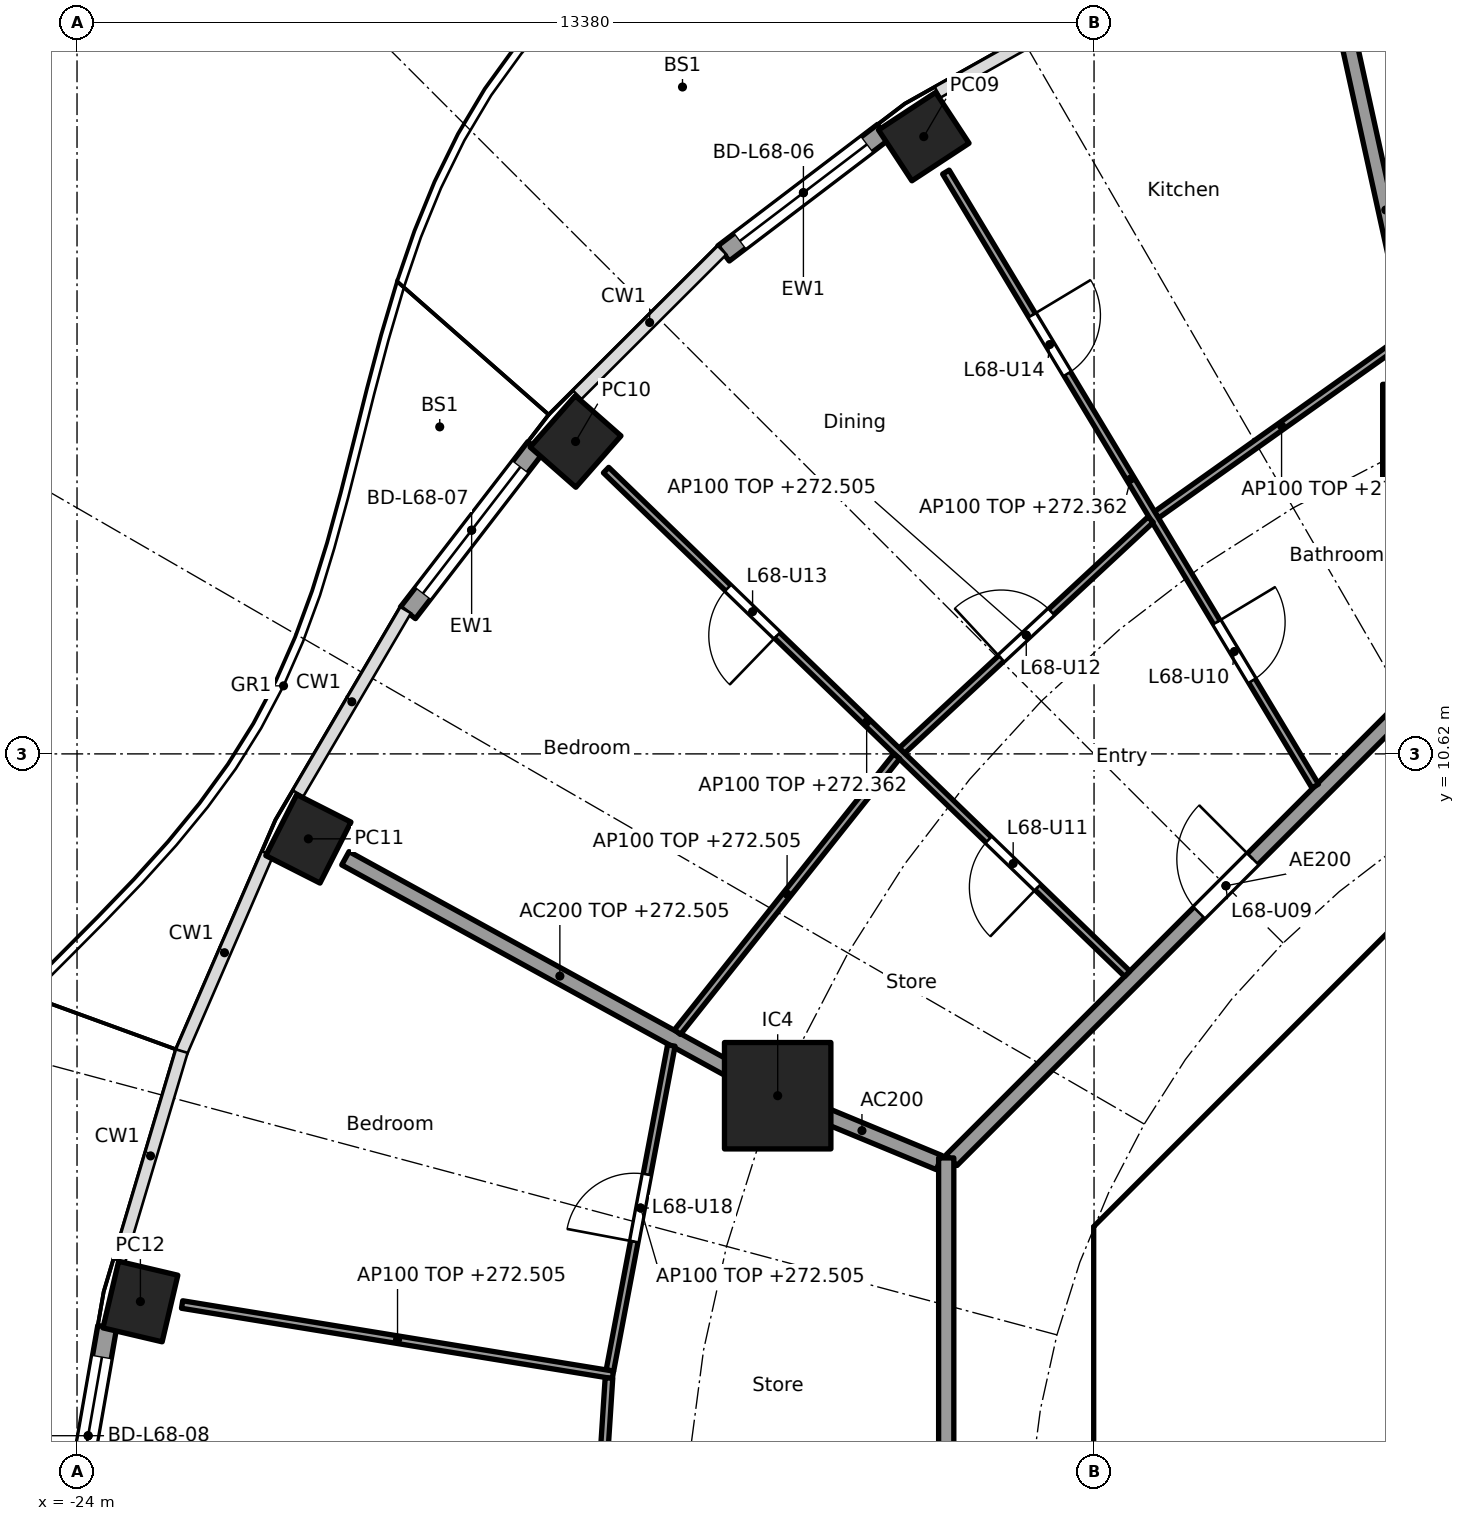
"""IFC4 building model, lengths in metres.
Left out: names, types, materials, properties, quantities, classifications, styles, units other than length and angle.
Written with IfcOpenShell. Run it as: python <this file> out.ifc"""

import sys

from ifc_helpers import new_model, si_unit, direction, frame, frame_2d, origin, origin_2d, place, context, subcontext, project, spatial, polyline, rectangle, hollow_rectangle, outline, extrude, element, fill, save


model = new_model("IFC4")
c1 = context("Model", 3, precision=1e-05, world=origin(), true_north=direction((0.0, 1.0)))
c2 = subcontext(c1, "Body", "Model", "MODEL_VIEW")
j1 = project(units=[si_unit("LENGTHUNIT", "METRE"), si_unit("PLANEANGLEUNIT", "RADIAN")], contexts=[c1])
p1 = place(None, origin())
s1 = spatial("IfcSite", under=j1, at=p1, CompositionType="ELEMENT")
p2 = place(p1, origin())
s2 = spatial("IfcBuilding", under=s1, at=p2, CompositionType="ELEMENT")
p3 = place(p2, frame((0.0, 0.0, 269.6)))
s3 = spatial("IfcBuildingStorey", under=s2, at=p3, CompositionType="ELEMENT", Elevation=269.6)
for number, where, z_axis, x_axis in (
    (1, (-12.86, 18.741, 0.0), (0.0, 0.0, 1.0), (-0.836, -0.549, 0.0)),
    (2, (-17.441, 14.73, 0.0), (0.0, 0.0, 1.0), (-0.66, -0.751, 0.0)),
    (3, (-20.957, 9.502, 0.0), (0.0, 0.0, 1.0), (-0.452, -0.892, 0.0)),
    (4, (-23.166, 3.415, 0.0), (0.0, 0.0, 1.0), (-0.229, -0.973, 0.0)),
):
    element("IfcColumn", number, at=place(p3, frame(where, z_axis=z_axis, x_axis=x_axis)), inside=s3, PredefinedType="COLUMN", context=c2, shape_type="SweptSolid", body=[
        extrude(hollow_rectangle(XDim=0.9, YDim=0.8, WallThickness=0.028, at=origin_2d()), origin(), (0.0, 0.0, 1.0), 3.7),
    ])
for number, where, z_axis, x_axis in (
    (5, (-6.123, 14.782, 0.0), (0.0, 0.0, 1.0), (1.0, 0.0, 0.0)),
    (6, (-14.782, 6.123, 0.0), (0.0, 0.0, 1.0), (1.0, 0.0, 0.0)),
):
    element("IfcColumn", number, at=place(p3, frame(where, z_axis=z_axis, x_axis=x_axis)), inside=s3, PredefinedType="COLUMN", context=c2, shape_type="SweptSolid", body=[
        extrude(rectangle(XDim=1.4, YDim=1.4, at=origin_2d()), origin(), (0.0, 0.0, 1.0), 3.7),
    ])
p4 = place(p3, frame((-15.495, 17.204, 0.0), z_axis=(0.0, 0.0, 1.0), x_axis=(0.796010739377, 0.605282498339, 0.0)))
e7 = element("IfcWall", 7, at=p4, inside=s3, PredefinedType="SOLIDWALL", context=c2, shape_type="SweptSolid", body=[
    extrude(rectangle(XDim=2.641, YDim=0.25, at=frame_2d((1.32, 0.0))), origin(), (0.0, 0.0, 1.0), 3.44),
])
p5 = place(p4, frame((0.27, 0.0, 0.0)))
e8 = element("IfcOpeningElement", 8, at=p5, cuts=e7, PredefinedType="OPENING", context=c2, shape_type="SweptSolid", body=[
    extrude(rectangle(XDim=2.1, YDim=2.4, at=frame_2d((1.05, 1.2))), frame((0.0, 0.135, 0.0), z_axis=(0.0, -1.0, 0.0), x_axis=(1.0, 0.0, 0.0)), (0.0, 0.0, 1.0), 0.27),
])
p6 = place(p3, frame((-19.647, 12.476, 0.0), z_axis=(0.0, 0.0, 1.0), x_axis=(0.610475325435, 0.79203527512, 0.0)))
e9 = element("IfcWall", 9, at=p6, inside=s3, PredefinedType="SOLIDWALL", context=c2, shape_type="SweptSolid", body=[
    extrude(rectangle(XDim=2.746, YDim=0.25, at=frame_2d((1.373, 0.0))), origin(), (0.0, 0.0, 1.0), 3.44),
])
p7 = place(p6, frame((0.323, 0.0, 0.0)))
e10 = element("IfcOpeningElement", 10, at=p7, cuts=e9, PredefinedType="OPENING", context=c2, shape_type="SweptSolid", body=[
    extrude(rectangle(XDim=2.1, YDim=2.4, at=frame_2d((1.05, 1.2))), frame((0.0, 0.135, 0.0), z_axis=(0.0, -1.0, 0.0), x_axis=(1.0, 0.0, 0.0)), (0.0, 0.0, 1.0), 0.27),
])
p8 = place(p3, frame((-24.103, 0.22, 0.0), z_axis=(0.0, 0.0, 1.0), x_axis=(0.172182411767, 0.985065082661, 0.0)))
e11 = element("IfcWall", 11, at=p8, inside=s3, PredefinedType="SOLIDWALL", context=c2, shape_type="SweptSolid", body=[
    extrude(rectangle(XDim=2.903, YDim=0.25, at=frame_2d((1.451, 0.0))), origin(), (0.0, 0.0, 1.0), 3.44),
])
p9 = place(p8, frame((0.401, 0.0, 0.0)))
e12 = element("IfcOpeningElement", 12, at=p9, cuts=e11, PredefinedType="OPENING", context=c2, shape_type="SweptSolid", body=[
    extrude(rectangle(XDim=2.1, YDim=2.4, at=frame_2d((1.05, 1.2))), frame((0.0, 0.135, 0.0), z_axis=(0.0, -1.0, 0.0), x_axis=(1.0, 0.0, 0.0)), (0.0, 0.0, 1.0), 0.27),
])
p10 = place(p3, frame((-4.613, 9.988, 0.0), z_axis=(0.0, 0.0, 1.0), x_axis=(-0.707106781187, -0.707106781187, 0.0)))
e13 = element("IfcWall", 13, at=p10, inside=s3, PredefinedType="SHEAR", context=c2, shape_type="SweptSolid", body=[
    extrude(rectangle(XDim=7.602, YDim=0.6, at=frame_2d((3.801, 0.0))), origin(), (0.0, 0.0, 1.0), 3.44),
])
p11 = place(p10, frame((0.351, 0.0, 0.0)))
e14 = element("IfcOpeningElement", 14, at=p11, cuts=e13, PredefinedType="OPENING", context=c2, shape_type="SweptSolid", body=[
    extrude(rectangle(XDim=1.1, YDim=2.1, at=frame_2d((0.55, 1.05))), frame((0.0, 0.31, 0.0), z_axis=(0.0, -1.0, 0.0), x_axis=(1.0, 0.0, 0.0)), (0.0, 0.0, 1.0), 0.62),
])
p12 = place(p3, frame((-10.325, 3.801, 0.0), z_axis=(0.0, 0.0, 1.0), x_axis=(0.0, -1.0, 0.0)))
e15 = element("IfcWall", 15, at=p12, inside=s3, PredefinedType="SHEAR", context=c2, shape_type="SweptSolid", body=[
    extrude(rectangle(XDim=7.602, YDim=0.6, at=frame_2d((3.801, 0.0))), origin(), (0.0, 0.0, 1.0), 3.44),
])
p13 = place(p12, frame((0.651, 0.0, 0.0)))
e16 = element("IfcOpeningElement", 16, at=p13, cuts=e15, PredefinedType="OPENING", context=c2, shape_type="SweptSolid", body=[
    extrude(rectangle(XDim=1.5, YDim=2.1, at=frame_2d((0.75, 1.05))), frame((0.0, 0.31, 0.0), z_axis=(0.0, -1.0, 0.0), x_axis=(1.0, 0.0, 0.0)), (0.0, 0.0, 1.0), 0.62),
])
p14 = place(p12, frame((5.451, 0.0, 0.0)))
e17 = element("IfcOpeningElement", 17, at=p14, cuts=e15, PredefinedType="OPENING", context=c2, shape_type="SweptSolid", body=[
    extrude(rectangle(XDim=1.5, YDim=2.1, at=frame_2d((0.75, 1.05))), frame((0.0, 0.31, 0.0), z_axis=(0.0, -1.0, 0.0), x_axis=(1.0, 0.0, 0.0)), (0.0, 0.0, 1.0), 0.62),
])
p15 = place(p3, origin())
e18 = element("IfcWall", 18, at=p15, inside=s3, PredefinedType="SHEAR", context=c2, shape_type="SweptSolid", body=[
    extrude(outline(polyline([(-10.2, 4.825), (-9.776, 4.401), (-10.025, 4.152), (-10.025, 3.801), (-10.625, 3.801), (-10.625, 4.401), (-10.2, 4.825)])), origin(), (0.0, 0.0, 1.0), 3.44),
])
p16 = place(p3, frame((-10.025, 4.0, 0.0), z_axis=(0.0, 0.0, 1.0), x_axis=(1.0, 0.0, 0.0)))
e19 = element("IfcWall", 19, at=p16, inside=s3, PredefinedType="PARTITIONING", context=c2, shape_type="SweptSolid", body=[
    extrude(rectangle(XDim=3.325, YDim=0.2, at=frame_2d((1.662, 0.0))), origin(), (0.0, 0.0, 1.0), 3.44),
])
p17 = place(p3, frame((-8.301, 5.8, 0.0), z_axis=(0.0, 0.0, 1.0), x_axis=(1.0, 0.0, 0.0)))
e20 = element("IfcWall", 20, at=p17, inside=s3, PredefinedType="PARTITIONING", context=c2, shape_type="SweptSolid", body=[
    extrude(rectangle(XDim=2.426, YDim=0.15, at=frame_2d((1.213, 0.0))), origin(), (0.0, 0.0, 1.0), 3.44),
])
p18 = place(p3, frame((-6.134, 14.831, 0.0), z_axis=(0.0, 0.0, 1.0), x_axis=(-0.214842475666, 0.976648714047, 0.0)))
e21 = element("IfcWall", 21, at=p18, inside=s3, PredefinedType="PARTITIONING", context=c2, shape_type="SweptSolid", body=[
    extrude(rectangle(XDim=6.031, YDim=0.2, at=frame_2d((3.015, 0.0))), origin(), (0.0, 0.0, 1.0), 2.905),
])
p19 = place(p3, frame((-12.657, 5.243, 0.0), z_axis=(0.0, 0.0, 1.0), x_axis=(-0.923869415315, 0.382707856524, 0.0)))
e22 = element("IfcWall", 22, at=p19, inside=s3, PredefinedType="PARTITIONING", context=c2, shape_type="SweptSolid", body=[
    extrude(rectangle(XDim=2.2, YDim=0.2, at=frame_2d((1.1, 0.0))), origin(), (0.0, 0.0, 1.0), 3.44),
])
p20 = place(p3, frame((-14.826, 6.147, 0.0), z_axis=(0.0, 0.0, 1.0), x_axis=(-0.876484755865, 0.481429613481, 0.0)))
e23 = element("IfcWall", 23, at=p20, inside=s3, PredefinedType="PARTITIONING", context=c2, shape_type="SweptSolid", body=[
    extrude(rectangle(XDim=6.439, YDim=0.2, at=frame_2d((3.219, 0.0))), origin(), (0.0, 0.0, 1.0), 2.905),
])
p21 = place(p3, frame((-5.275, 12.494, 0.0), z_axis=(0.0, 0.0, 1.0), x_axis=(-0.707106781187, -0.707106781187, 0.0)))
e24 = element("IfcWall", 24, at=p21, inside=s3, PredefinedType="PARTITIONING", context=c2, shape_type="SweptSolid", body=[
    extrude(rectangle(XDim=10.209, YDim=0.2, at=frame_2d((5.104, 0.0))), origin(), (0.0, 0.0, 1.0), 3.44),
])
p22 = place(p21, frame((4.604, 0.0, 0.0)))
e25 = element("IfcOpeningElement", 25, at=p22, cuts=e24, PredefinedType="OPENING", context=c2, shape_type="SweptSolid", body=[
    extrude(rectangle(XDim=1.0, YDim=2.1, at=frame_2d((0.5, 1.05))), frame((0.0, 0.11, 0.0), z_axis=(0.0, -1.0, 0.0), x_axis=(1.0, 0.0, 0.0)), (0.0, 0.0, 1.0), 0.22),
])
p23 = place(p3, frame((-12.565, 5.304, 0.0), z_axis=(0.0, 0.0, 1.0), x_axis=(0.0, -1.0, 0.0)))
e26 = element("IfcWall", 26, at=p23, inside=s3, PredefinedType="PARTITIONING", context=c2, shape_type="SweptSolid", body=[
    extrude(rectangle(XDim=10.409, YDim=0.2, at=frame_2d((5.205, 0.0))), origin(), (0.0, 0.0, 1.0), 3.44),
])
p24 = place(p23, frame((6.539, 0.0, 0.0)))
e27 = element("IfcOpeningElement", 27, at=p24, cuts=e26, PredefinedType="OPENING", context=c2, shape_type="SweptSolid", body=[
    extrude(rectangle(XDim=1.0, YDim=2.1, at=frame_2d((0.5, 1.05))), frame((0.0, 0.11, 0.0), z_axis=(0.0, -1.0, 0.0), x_axis=(1.0, 0.0, 0.0)), (0.0, 0.0, 1.0), 0.22),
])
p25 = place(p3, frame((-6.508, 16.103, 0.0), z_axis=(0.0, 0.0, 1.0), x_axis=(-0.815202203556, -0.579176456114, 0.0)))
e28 = element("IfcWall", 28, at=p25, inside=s3, PredefinedType="PARTITIONING", context=c2, shape_type="SweptSolid", body=[
    extrude(rectangle(XDim=4.036, YDim=0.1, at=frame_2d((2.018, 0.0))), origin(), (0.0, 0.0, 1.0), 2.905),
])
p26 = place(p3, frame((-7.709, 10.197, 0.0), z_axis=(0.0, 0.0, 1.0), x_axis=(-0.515516160663, 0.856879856278, 0.0)))
e29 = element("IfcWall", 29, at=p26, inside=s3, PredefinedType="PARTITIONING", context=c2, shape_type="SweptSolid", body=[
    extrude(rectangle(XDim=9.426, YDim=0.1, at=frame_2d((4.713, 0.0))), origin(), (0.0, 0.0, 1.0), 2.762),
])
p27 = place(p26, frame((1.615, 0.0, 0.0)))
e30 = element("IfcOpeningElement", 30, at=p27, cuts=e29, PredefinedType="OPENING", context=c2, shape_type="SweptSolid", body=[
    extrude(rectangle(XDim=0.9, YDim=2.1, at=frame_2d((0.45, 1.05))), frame((0.0, 0.06, 0.0), z_axis=(0.0, -1.0, 0.0), x_axis=(1.0, 0.0, 0.0)), (0.0, 0.0, 1.0), 0.12),
])
p28 = place(p26, frame((6.328, 0.0, 0.0)))
e31 = element("IfcOpeningElement", 31, at=p28, cuts=e29, PredefinedType="OPENING", context=c2, shape_type="SweptSolid", body=[
    extrude(rectangle(XDim=0.9, YDim=2.1, at=frame_2d((0.45, 1.05))), frame((0.0, 0.06, 0.0), z_axis=(0.0, -1.0, 0.0), x_axis=(1.0, 0.0, 0.0)), (0.0, 0.0, 1.0), 0.12),
])
p29 = place(p3, frame((-9.875, 13.702, 0.0), z_axis=(0.0, 0.0, 1.0), x_axis=(-0.732618266441, -0.680639754699, 0.0)))
e32 = element("IfcWall", 32, at=p29, inside=s3, PredefinedType="PARTITIONING", context=c2, shape_type="SweptSolid", body=[
    extrude(rectangle(XDim=4.467, YDim=0.1, at=frame_2d((2.233, 0.0))), origin(), (0.0, 0.0, 1.0), 2.905),
])
p30 = place(p29, frame((1.783, 0.0, 0.0)))
e33 = element("IfcOpeningElement", 33, at=p30, cuts=e32, PredefinedType="OPENING", context=c2, shape_type="SweptSolid", body=[
    extrude(rectangle(XDim=0.9, YDim=2.1, at=frame_2d((0.45, 1.05))), frame((0.0, 0.06, 0.0), z_axis=(0.0, -1.0, 0.0), x_axis=(1.0, 0.0, 0.0)), (0.0, 0.0, 1.0), 0.12),
])
p31 = place(p3, frame((-10.183, 7.727, 0.0), z_axis=(0.0, 0.0, 1.0), x_axis=(-0.719063433856, 0.694944442449, 0.0)))
e34 = element("IfcWall", 34, at=p31, inside=s3, PredefinedType="PARTITIONING", context=c2, shape_type="SweptSolid", body=[
    extrude(rectangle(XDim=9.535, YDim=0.1, at=frame_2d((4.768, 0.0))), origin(), (0.0, 0.0, 1.0), 2.762),
])
p32 = place(p31, frame((1.637, 0.0, 0.0)))
e35 = element("IfcOpeningElement", 35, at=p32, cuts=e34, PredefinedType="OPENING", context=c2, shape_type="SweptSolid", body=[
    extrude(rectangle(XDim=0.9, YDim=2.1, at=frame_2d((0.45, 1.05))), frame((0.0, 0.06, 0.0), z_axis=(0.0, -1.0, 0.0), x_axis=(1.0, 0.0, 0.0)), (0.0, 0.0, 1.0), 0.12),
])
p33 = place(p31, frame((6.405, 0.0, 0.0)))
e36 = element("IfcOpeningElement", 36, at=p33, cuts=e34, PredefinedType="OPENING", context=c2, shape_type="SweptSolid", body=[
    extrude(rectangle(XDim=0.9, YDim=2.1, at=frame_2d((0.45, 1.05))), frame((0.0, 0.06, 0.0), z_axis=(0.0, -1.0, 0.0), x_axis=(1.0, 0.0, 0.0)), (0.0, 0.0, 1.0), 0.12),
])
p34 = place(p3, frame((-13.216, 10.589, 0.0), z_axis=(0.0, 0.0, 1.0), x_axis=(-0.622251572882, -0.782817335045, 0.0)))
e37 = element("IfcWall", 37, at=p34, inside=s3, PredefinedType="PARTITIONING", context=c2, shape_type="SweptSolid", body=[
    extrude(rectangle(XDim=4.636, YDim=0.1, at=frame_2d((2.318, 0.0))), origin(), (0.0, 0.0, 1.0), 2.905),
])
p35 = place(p3, frame((-16.181, 6.783, 0.0), z_axis=(0.0, 0.0, 1.0), x_axis=(-0.185670583745, -0.982612046706, 0.0)))
e38 = element("IfcWall", 38, at=p35, inside=s3, PredefinedType="PARTITIONING", context=c2, shape_type="SweptSolid", body=[
    extrude(rectangle(XDim=4.351, YDim=0.1, at=frame_2d((2.176, 0.0))), origin(), (0.0, 0.0, 1.0), 2.905),
])
p36 = place(p35, frame((1.726, 0.0, 0.0)))
e39 = element("IfcOpeningElement", 39, at=p36, cuts=e38, PredefinedType="OPENING", context=c2, shape_type="SweptSolid", body=[
    extrude(rectangle(XDim=0.9, YDim=2.1, at=frame_2d((0.45, 1.05))), frame((0.0, 0.06, 0.0), z_axis=(0.0, -1.0, 0.0), x_axis=(1.0, 0.0, 0.0)), (0.0, 0.0, 1.0), 0.12),
])
p37 = place(p3, frame((-16.949, 2.451, 0.0), z_axis=(0.0, 0.0, 1.0), x_axis=(-0.986937570833, 0.161103169673, 0.0)))
e40 = element("IfcWall", 40, at=p37, inside=s3, PredefinedType="PARTITIONING", context=c2, shape_type="SweptSolid", body=[
    extrude(rectangle(XDim=5.743, YDim=0.1, at=frame_2d((2.872, 0.0))), origin(), (0.0, 0.0, 1.0), 2.905),
])
p38 = place(p3, frame((-17.002, 2.409, 0.0), z_axis=(0.0, 0.0, 1.0), x_axis=(-0.064855550758, -0.997894662545, 0.0)))
e41 = element("IfcWall", 41, at=p38, inside=s3, PredefinedType="PARTITIONING", context=c2, shape_type="SweptSolid", body=[
    extrude(rectangle(XDim=4.656, YDim=0.1, at=frame_2d((2.328, 0.0))), origin(), (0.0, 0.0, 1.0), 2.905),
])
p39 = place(p5, origin())
e42 = element("IfcDoor", 42, at=p39, inside=s3, OperationType="SLIDING_TO_LEFT", PredefinedType="DOOR", context=c2, shape_type="SweptSolid", body=[
    extrude(rectangle(XDim=2.1, YDim=2.4, at=frame_2d((1.05, 1.2))), frame((0.0, 0.025, 0.0), z_axis=(0.0, -1.0, 0.0), x_axis=(1.0, 0.0, 0.0)), (0.0, 0.0, 1.0), 0.05),
])
fill(e8, e42)
p40 = place(p7, origin())
e43 = element("IfcDoor", 43, at=p40, inside=s3, OperationType="SLIDING_TO_LEFT", PredefinedType="DOOR", context=c2, shape_type="SweptSolid", body=[
    extrude(rectangle(XDim=2.1, YDim=2.4, at=frame_2d((1.05, 1.2))), frame((0.0, 0.025, 0.0), z_axis=(0.0, -1.0, 0.0), x_axis=(1.0, 0.0, 0.0)), (0.0, 0.0, 1.0), 0.05),
])
fill(e10, e43)
p41 = place(p9, origin())
e44 = element("IfcDoor", 44, at=p41, inside=s3, OperationType="SLIDING_TO_LEFT", PredefinedType="DOOR", context=c2, shape_type="SweptSolid", body=[
    extrude(rectangle(XDim=2.1, YDim=2.4, at=frame_2d((1.05, 1.2))), frame((0.0, 0.025, 0.0), z_axis=(0.0, -1.0, 0.0), x_axis=(1.0, 0.0, 0.0)), (0.0, 0.0, 1.0), 0.05),
])
fill(e12, e44)
p42 = place(p13, origin())
e45 = element("IfcDoor", 45, at=p42, inside=s3, OperationType="DOUBLE_DOOR_SINGLE_SWING", PredefinedType="DOOR", context=c2, shape_type="SweptSolid", body=[
    extrude(rectangle(XDim=1.5, YDim=2.1, at=frame_2d((0.75, 1.05))), frame((0.0, 0.025, 0.0), z_axis=(0.0, -1.0, 0.0), x_axis=(1.0, 0.0, 0.0)), (0.0, 0.0, 1.0), 0.05),
])
fill(e16, e45)
p43 = place(p22, frame((1.0, 0.0, 0.0), x_axis=(-1.0, 0.0, 0.0)))
e46 = element("IfcDoor", 46, at=p43, inside=s3, OperationType="SINGLE_SWING_RIGHT", PredefinedType="DOOR", context=c2, shape_type="SweptSolid", body=[
    extrude(rectangle(XDim=1.0, YDim=2.1, at=frame_2d((0.5, 1.05))), frame((0.0, 0.025, 0.0), z_axis=(0.0, -1.0, 0.0), x_axis=(1.0, 0.0, 0.0)), (0.0, 0.0, 1.0), 0.05),
])
fill(e25, e46)
p44 = place(p27, frame((0.9, 0.0, 0.0), x_axis=(-1.0, 0.0, 0.0)))
e47 = element("IfcDoor", 47, at=p44, inside=s3, OperationType="SINGLE_SWING_LEFT", PredefinedType="DOOR", context=c2, shape_type="SweptSolid", body=[
    extrude(rectangle(XDim=0.9, YDim=2.1, at=frame_2d((0.45, 1.05))), frame((0.0, 0.025, 0.0), z_axis=(0.0, -1.0, 0.0), x_axis=(1.0, 0.0, 0.0)), (0.0, 0.0, 1.0), 0.05),
])
fill(e30, e47)
p45 = place(p32, origin())
e48 = element("IfcDoor", 48, at=p45, inside=s3, OperationType="SINGLE_SWING_LEFT", PredefinedType="DOOR", context=c2, shape_type="SweptSolid", body=[
    extrude(rectangle(XDim=0.9, YDim=2.1, at=frame_2d((0.45, 1.05))), frame((0.0, 0.025, 0.0), z_axis=(0.0, -1.0, 0.0), x_axis=(1.0, 0.0, 0.0)), (0.0, 0.0, 1.0), 0.05),
])
fill(e35, e48)
p46 = place(p30, frame((0.9, 0.0, 0.0), x_axis=(-1.0, 0.0, 0.0)))
e49 = element("IfcDoor", 49, at=p46, inside=s3, OperationType="SINGLE_SWING_LEFT", PredefinedType="DOOR", context=c2, shape_type="SweptSolid", body=[
    extrude(rectangle(XDim=0.9, YDim=2.1, at=frame_2d((0.45, 1.05))), frame((0.0, 0.025, 0.0), z_axis=(0.0, -1.0, 0.0), x_axis=(1.0, 0.0, 0.0)), (0.0, 0.0, 1.0), 0.05),
])
fill(e33, e49)
p47 = place(p33, origin())
e50 = element("IfcDoor", 50, at=p47, inside=s3, OperationType="SINGLE_SWING_LEFT", PredefinedType="DOOR", context=c2, shape_type="SweptSolid", body=[
    extrude(rectangle(XDim=0.9, YDim=2.1, at=frame_2d((0.45, 1.05))), frame((0.0, 0.025, 0.0), z_axis=(0.0, -1.0, 0.0), x_axis=(1.0, 0.0, 0.0)), (0.0, 0.0, 1.0), 0.05),
])
fill(e36, e50)
p48 = place(p28, frame((0.9, 0.0, 0.0), x_axis=(-1.0, 0.0, 0.0)))
e51 = element("IfcDoor", 51, at=p48, inside=s3, OperationType="SINGLE_SWING_LEFT", PredefinedType="DOOR", context=c2, shape_type="SweptSolid", body=[
    extrude(rectangle(XDim=0.9, YDim=2.1, at=frame_2d((0.45, 1.05))), frame((0.0, 0.025, 0.0), z_axis=(0.0, -1.0, 0.0), x_axis=(1.0, 0.0, 0.0)), (0.0, 0.0, 1.0), 0.05),
])
fill(e31, e51)
p49 = place(p36, frame((0.9, 0.0, 0.0), x_axis=(-1.0, 0.0, 0.0)))
e52 = element("IfcDoor", 52, at=p49, inside=s3, OperationType="SINGLE_SWING_LEFT", PredefinedType="DOOR", context=c2, shape_type="SweptSolid", body=[
    extrude(rectangle(XDim=0.9, YDim=2.1, at=frame_2d((0.45, 1.05))), frame((0.0, 0.025, 0.0), z_axis=(0.0, -1.0, 0.0), x_axis=(1.0, 0.0, 0.0)), (0.0, 0.0, 1.0), 0.05),
])
fill(e39, e52)
save(model, sys.argv[1])
